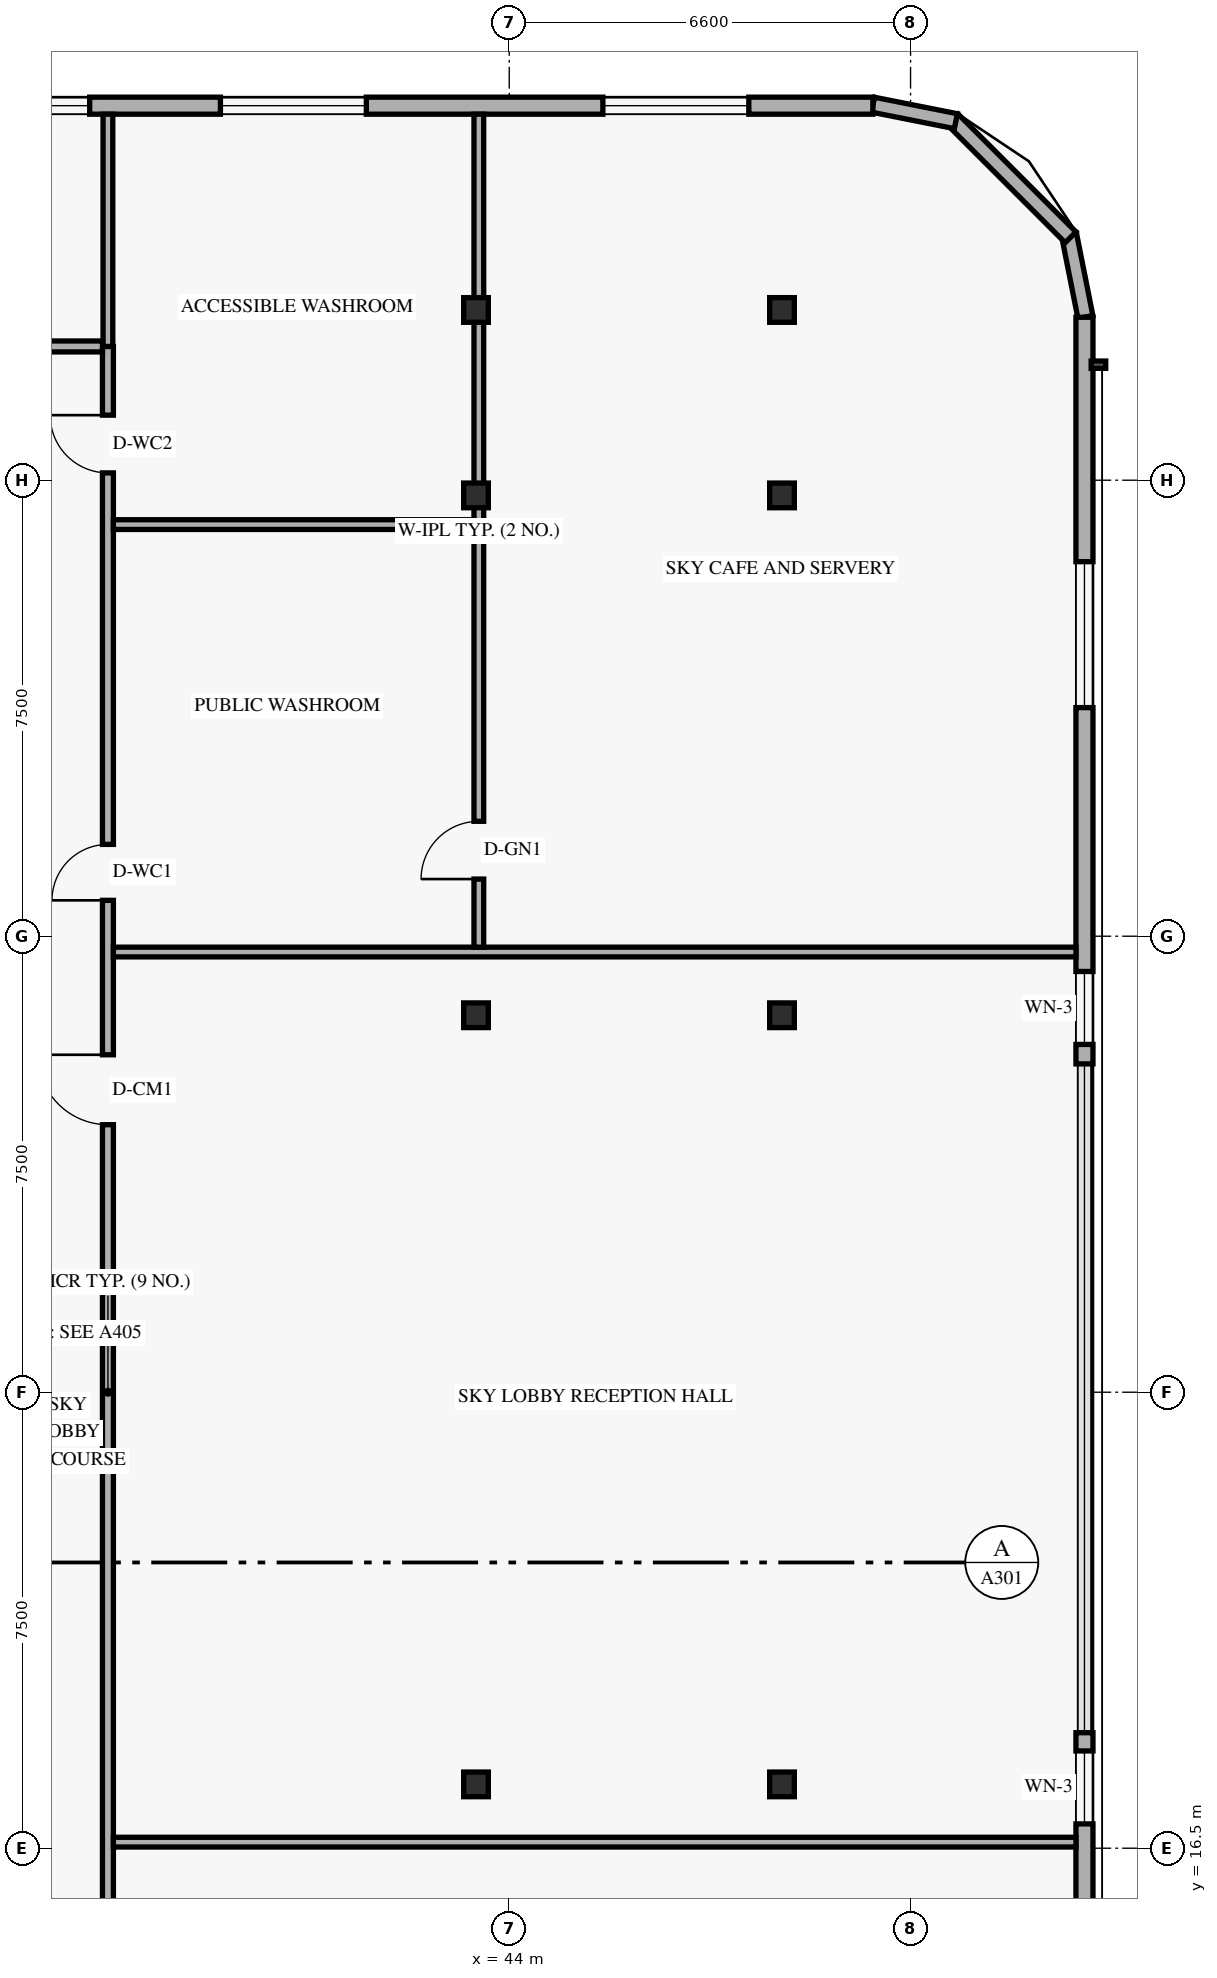
"""IFC4 building model, lengths in metres.
Left out: names, types, materials, properties, quantities, classifications, styles, units other than length and angle.
Written with IfcOpenShell. Run it as: python <this file> out.ifc"""

import sys

from ifc_helpers import new_model, si_unit, direction, frame, frame_2d, origin, origin_2d, place, context, subcontext, project, spatial, rectangle, hollow_rectangle, extrude, element, fill, save


model = new_model("IFC4")
c1 = context("Model", 3, precision=1e-05, world=origin(), true_north=direction((0.0, 1.0)))
c2 = subcontext(c1, "Body", "Model", "MODEL_VIEW")
j1 = project(units=[si_unit("LENGTHUNIT", "METRE"), si_unit("PLANEANGLEUNIT", "RADIAN")], contexts=[c1])
p1 = place(None, origin())
s1 = spatial("IfcSite", under=j1, at=p1, CompositionType="ELEMENT")
p2 = place(p1, origin())
s2 = spatial("IfcBuilding", under=s1, at=p2, CompositionType="ELEMENT")
p3 = place(p2, frame((0.0, 0.0, 98.4)))
s3 = spatial("IfcBuildingStorey", under=s2, at=p3, CompositionType="ELEMENT", Elevation=98.4)
for number, where, z_axis, x_axis in (
    (1, (43.38, 17.55, 0.0), (0.035, 0.0, 0.999), (0.0, 1.0, 0.0)),
    (2, (43.38, 30.2, 0.0), (0.035, 0.0, 0.999), (0.0, 1.0, 0.0)),
    (3, (43.38, 38.75, 0.0), (0.035, 0.0, 0.999), (0.0, 1.0, 0.0)),
    (4, (43.38, 41.8, 0.0), (0.035, 0.0, 0.999), (0.0, 1.0, 0.0)),
):
    element("IfcColumn", number, at=place(p3, frame(where, z_axis=z_axis, x_axis=x_axis)), inside=s3, PredefinedType="COLUMN", context=c2, shape_type="SweptSolid", body=[
        extrude(hollow_rectangle(XDim=0.406, YDim=0.406, WallThickness=0.016, at=origin_2d()), origin(), (0.0, 0.0, 1.0), 4.203),
    ])
for number, where, z_axis, x_axis in (
    (5, (48.364, 17.55, 0.0), (0.058, 0.0, 0.998), (0.0, 1.0, 0.0)),
    (6, (48.364, 30.2, 0.0), (0.058, 0.0, 0.998), (0.0, 1.0, 0.0)),
    (7, (48.364, 38.75, 0.0), (0.058, 0.0, 0.998), (0.0, 1.0, 0.0)),
    (8, (48.364, 41.8, 0.0), (0.058, 0.0, 0.998), (0.0, 1.0, 0.0)),
):
    element("IfcColumn", number, at=place(p3, frame(where, z_axis=z_axis, x_axis=x_axis)), inside=s3, PredefinedType="COLUMN", context=c2, shape_type="SweptSolid", body=[
        extrude(hollow_rectangle(XDim=0.406, YDim=0.406, WallThickness=0.016, at=origin_2d()), origin(), (0.0, 0.0, 1.0), 4.207),
    ])
p4 = place(p3, frame((53.476, 41.684, 0.0), z_axis=(0.0, 0.0, 1.0), x_axis=(-0.195000137217, 0.980803214965, 0.0)))
e9 = element("IfcWall", 9, at=p4, inside=s3, PredefinedType="SOLIDWALL", context=c2, shape_type="SweptSolid", body=[
    extrude(rectangle(XDim=1.388, YDim=0.25, at=frame_2d((0.694, 0.0))), origin(), (0.0, 0.0, 1.0), 3.96),
])
p5 = place(p3, frame((53.232, 42.995, 0.0), z_axis=(0.0, 0.0, 1.0), x_axis=(-0.707151344399, 0.707062215165, 0.0)))
e10 = element("IfcWall", 10, at=p5, inside=s3, PredefinedType="SOLIDWALL", context=c2, shape_type="SweptSolid", body=[
    extrude(rectangle(XDim=2.739, YDim=0.25, at=frame_2d((1.37, 0.0))), origin(), (0.0, 0.0, 1.0), 3.96),
])
p6 = place(p3, frame((51.345, 44.905, 0.0), z_axis=(0.0, 0.0, 1.0), x_axis=(-0.980809899341, 0.19496651342, 0.0)))
e11 = element("IfcWall", 11, at=p6, inside=s3, PredefinedType="SOLIDWALL", context=c2, shape_type="SweptSolid", body=[
    extrude(rectangle(XDim=1.389, YDim=0.25, at=frame_2d((0.694, 0.0))), origin(), (0.0, 0.0, 1.0), 3.96),
])
p7 = place(p3, frame((53.46, 6.32, 0.0), z_axis=(0.0, 0.0, 1.0), x_axis=(0.0, 1.0, 0.0)))
e12 = element("IfcWall", 12, at=p7, inside=s3, PredefinedType="SOLIDWALL", context=c2, shape_type="SweptSolid", body=[
    extrude(rectangle(XDim=12.08, YDim=0.28, at=frame_2d((6.04, 0.0))), origin(), (0.0, 0.0, 1.0), 3.96),
])
p8 = place(p7, frame((3.94, 0.0, 0.85)))
e13 = element("IfcOpeningElement", 13, at=p8, cuts=e12, PredefinedType="OPENING", context=c2, shape_type="SweptSolid", body=[
    extrude(rectangle(XDim=2.4, YDim=1.9, at=frame_2d((1.2, 0.95))), frame((0.0, 0.15, 0.0), z_axis=(0.0, -1.0, 0.0), x_axis=(1.0, 0.0, 0.0)), (0.0, 0.0, 1.0), 0.3),
])
p9 = place(p7, frame((10.58, 0.0, 0.85)))
e14 = element("IfcOpeningElement", 14, at=p9, cuts=e12, PredefinedType="OPENING", context=c2, shape_type="SweptSolid", body=[
    extrude(rectangle(XDim=1.2, YDim=1.5, at=frame_2d((0.6, 0.75))), frame((0.0, 0.15, 0.0), z_axis=(0.0, -1.0, 0.0), x_axis=(1.0, 0.0, 0.0)), (0.0, 0.0, 1.0), 0.3),
])
p10 = place(p3, frame((53.46, 29.4, 0.0), z_axis=(0.0, 0.0, 1.0), x_axis=(0.0, 1.0, 0.0)))
e15 = element("IfcWall", 15, at=p10, inside=s3, PredefinedType="SOLIDWALL", context=c2, shape_type="SweptSolid", body=[
    extrude(rectangle(XDim=12.28, YDim=0.28, at=frame_2d((6.14, 0.0))), origin(), (0.0, 0.0, 1.0), 3.96),
])
p11 = place(p10, frame((0.32, 0.0, 0.85)))
e16 = element("IfcOpeningElement", 16, at=p11, cuts=e15, PredefinedType="OPENING", context=c2, shape_type="SweptSolid", body=[
    extrude(rectangle(XDim=1.2, YDim=1.5, at=frame_2d((0.6, 0.75))), frame((0.0, 0.15, 0.0), z_axis=(0.0, -1.0, 0.0), x_axis=(1.0, 0.0, 0.0)), (0.0, 0.0, 1.0), 0.3),
])
p12 = place(p10, frame((5.86, 0.0, 0.85)))
e17 = element("IfcOpeningElement", 17, at=p12, cuts=e15, PredefinedType="OPENING", context=c2, shape_type="SweptSolid", body=[
    extrude(rectangle(XDim=2.4, YDim=1.9, at=frame_2d((1.2, 0.95))), frame((0.0, 0.15, 0.0), z_axis=(0.0, -1.0, 0.0), x_axis=(1.0, 0.0, 0.0)), (0.0, 0.0, 1.0), 0.3),
])
p13 = place(p3, frame((49.98, 45.16, 0.0), z_axis=(0.0, 0.0, 1.0), x_axis=(-1.0, 0.0, 0.0)))
e18 = element("IfcWall", 18, at=p13, inside=s3, PredefinedType="SOLIDWALL", context=c2, shape_type="SweptSolid", body=[
    extrude(rectangle(XDim=15.58, YDim=0.28, at=frame_2d((7.79, 0.0))), origin(), (0.0, 0.0, 1.0), 3.96),
])
p14 = place(p13, frame((12.88, 0.0, 0.85)))
e19 = element("IfcOpeningElement", 19, at=p14, cuts=e18, PredefinedType="OPENING", context=c2, shape_type="SweptSolid", body=[
    extrude(rectangle(XDim=2.4, YDim=1.9, at=frame_2d((1.2, 0.95))), frame((0.0, 0.15, 0.0), z_axis=(0.0, -1.0, 0.0), x_axis=(1.0, 0.0, 0.0)), (0.0, 0.0, 1.0), 0.3),
])
p15 = place(p13, frame((8.33, 0.0, 0.85)))
e20 = element("IfcOpeningElement", 20, at=p15, cuts=e18, PredefinedType="OPENING", context=c2, shape_type="SweptSolid", body=[
    extrude(rectangle(XDim=2.4, YDim=1.9, at=frame_2d((1.2, 0.95))), frame((0.0, 0.15, 0.0), z_axis=(0.0, -1.0, 0.0), x_axis=(1.0, 0.0, 0.0)), (0.0, 0.0, 1.0), 0.3),
])
p16 = place(p13, frame((2.04, 0.0, 0.85)))
e21 = element("IfcOpeningElement", 21, at=p16, cuts=e18, PredefinedType="OPENING", context=c2, shape_type="SweptSolid", body=[
    extrude(rectangle(XDim=2.4, YDim=1.9, at=frame_2d((1.2, 0.95))), frame((0.0, 0.15, 0.0), z_axis=(0.0, -1.0, 0.0), x_axis=(1.0, 0.0, 0.0)), (0.0, 0.0, 1.0), 0.3),
])
p17 = place(p3, frame((37.4, 6.8, 0.0), z_axis=(0.0, 0.0, 1.0), x_axis=(0.0, 1.0, 0.0)))
e22 = element("IfcWall", 22, at=p17, inside=s3, PredefinedType="STANDARD", context=c2, shape_type="SweptSolid", body=[
    extrude(rectangle(XDim=34.4, YDim=0.18, at=frame_2d((17.2, 0.0))), origin(), (0.0, 0.0, 1.0), 3.331),
])
p18 = place(p17, frame((25.29, 0.0, 0.0)))
e23 = element("IfcOpeningElement", 23, at=p18, cuts=e22, PredefinedType="OPENING", context=c2, shape_type="SweptSolid", body=[
    extrude(rectangle(XDim=0.92, YDim=2.14, at=frame_2d((0.46, 1.07))), frame((0.0, 0.1, 0.0), z_axis=(0.0, -1.0, 0.0), x_axis=(1.0, 0.0, 0.0)), (0.0, 0.0, 1.0), 0.2),
])
p19 = place(p17, frame((32.32, 0.0, 0.0)))
e24 = element("IfcOpeningElement", 24, at=p19, cuts=e22, PredefinedType="OPENING", context=c2, shape_type="SweptSolid", body=[
    extrude(rectangle(XDim=0.95, YDim=2.14, at=frame_2d((0.475, 1.07))), frame((0.0, 0.1, 0.0), z_axis=(0.0, -1.0, 0.0), x_axis=(1.0, 0.0, 0.0)), (0.0, 0.0, 1.0), 0.2),
])
p20 = place(p17, frame((2.8, 0.0, 0.0)))
e25 = element("IfcOpeningElement", 25, at=p20, cuts=e22, PredefinedType="OPENING", context=c2, shape_type="SweptSolid", body=[
    extrude(rectangle(XDim=1.15, YDim=2.15, at=frame_2d((0.575, 1.075))), frame((0.0, 0.1, 0.0), z_axis=(0.0, -1.0, 0.0), x_axis=(1.0, 0.0, 0.0)), (0.0, 0.0, 1.0), 0.2),
])
p21 = place(p17, frame((21.6, 0.0, 0.0)))
e26 = element("IfcOpeningElement", 26, at=p21, cuts=e22, PredefinedType="OPENING", context=c2, shape_type="SweptSolid", body=[
    extrude(rectangle(XDim=1.15, YDim=2.15, at=frame_2d((0.575, 1.075))), frame((0.0, 0.1, 0.0), z_axis=(0.0, -1.0, 0.0), x_axis=(1.0, 0.0, 0.0)), (0.0, 0.0, 1.0), 0.2),
])
p22 = place(p3, frame((37.4, 41.2, 0.0), z_axis=(0.0, 0.0, 1.0), x_axis=(0.0, 1.0, 0.0)))
e27 = element("IfcWall", 27, at=p22, inside=s3, PredefinedType="PARTITIONING", context=c2, shape_type="SweptSolid", body=[
    extrude(rectangle(XDim=3.82, YDim=0.16, at=frame_2d((1.91, 0.0))), origin(), (0.0, 0.0, 1.0), 3.409),
])
for number, where, z_axis, x_axis in (
    (28, (37.49, 16.6, 0.0), (0.0, 0.0, 1.0), (1.0, 0.0, 0.0)),
    (29, (37.49, 31.24, 0.0), (0.0, 0.0, 1.0), (1.0, 0.0, 0.0)),
):
    element("IfcWall", number, at=place(p3, frame(where, z_axis=z_axis, x_axis=x_axis)), inside=s3, PredefinedType="PARTITIONING", context=c2, shape_type="SweptSolid", body=[
        extrude(rectangle(XDim=15.83, YDim=0.16, at=frame_2d((7.915, 0.0))), origin(), (0.0, 0.0, 1.0), 3.331),
    ])
p23 = place(p3, frame((43.5, 31.32, 0.0), z_axis=(0.0, 0.0, 1.0), x_axis=(0.0, 1.0, 0.0)))
e30 = element("IfcWall", 30, at=p23, inside=s3, PredefinedType="PLUMBINGWALL", context=c2, shape_type="SweptSolid", body=[
    extrude(rectangle(XDim=13.7, YDim=0.16, at=frame_2d((6.85, 0.0))), origin(), (0.0, 0.0, 1.0), 3.331),
])
p24 = place(p23, frame((1.12, 0.0, 0.0)))
e31 = element("IfcOpeningElement", 31, at=p24, cuts=e30, PredefinedType="OPENING", context=c2, shape_type="SweptSolid", body=[
    extrude(rectangle(XDim=0.95, YDim=2.15, at=frame_2d((0.475, 1.075))), frame((0.0, 0.09, 0.0), z_axis=(0.0, -1.0, 0.0), x_axis=(1.0, 0.0, 0.0)), (0.0, 0.0, 1.0), 0.18),
])
p25 = place(p3, frame((37.49, 38.27, 0.0), z_axis=(0.0, 0.0, 1.0), x_axis=(1.0, 0.0, 0.0)))
e32 = element("IfcWall", 32, at=p25, inside=s3, PredefinedType="PLUMBINGWALL", context=c2, shape_type="SweptSolid", body=[
    extrude(rectangle(XDim=5.93, YDim=0.16, at=frame_2d((2.965, 0.0))), origin(), (0.0, 0.0, 1.0), 3.331),
])
p26 = place(p3, frame((21.74, 41.2, 0.0), z_axis=(0.0, 0.0, 1.0), x_axis=(1.0, 0.0, 0.0)))
e33 = element("IfcWall", 33, at=p26, inside=s3, PredefinedType="STANDARD", context=c2, shape_type="SweptSolid", body=[
    extrude(rectangle(XDim=15.57, YDim=0.18, at=frame_2d((7.785, 0.0))), origin(), (0.0, 0.0, 1.0), 3.331),
])
p27 = place(p26, frame((5.41, 0.0, 0.0)))
e34 = element("IfcOpeningElement", 34, at=p27, cuts=e33, PredefinedType="OPENING", context=c2, shape_type="SweptSolid", body=[
    extrude(rectangle(XDim=0.95, YDim=2.15, at=frame_2d((0.475, 1.075))), frame((0.0, 0.1, 0.0), z_axis=(0.0, -1.0, 0.0), x_axis=(1.0, 0.0, 0.0)), (0.0, 0.0, 1.0), 0.2),
])
p28 = place(p9, origin())
e35 = element("IfcWindow", 35, at=p28, inside=s3, PartitioningType="SINGLE_PANEL", PredefinedType="WINDOW", context=c2, shape_type="SweptSolid", body=[
    extrude(rectangle(XDim=1.2, YDim=1.5, at=frame_2d((0.6, 0.75))), frame((0.0, 0.03, 0.0), z_axis=(0.0, -1.0, 0.0), x_axis=(1.0, 0.0, 0.0)), (0.0, 0.0, 1.0), 0.06),
])
fill(e14, e35)
p29 = place(p11, origin())
e36 = element("IfcWindow", 36, at=p29, inside=s3, PartitioningType="SINGLE_PANEL", PredefinedType="WINDOW", context=c2, shape_type="SweptSolid", body=[
    extrude(rectangle(XDim=1.2, YDim=1.5, at=frame_2d((0.6, 0.75))), frame((0.0, 0.03, 0.0), z_axis=(0.0, -1.0, 0.0), x_axis=(1.0, 0.0, 0.0)), (0.0, 0.0, 1.0), 0.06),
])
fill(e16, e36)
p30 = place(p12, origin())
e37 = element("IfcWindow", 37, at=p30, inside=s3, PartitioningType="SINGLE_PANEL", PredefinedType="WINDOW", context=c2, shape_type="SweptSolid", body=[
    extrude(rectangle(XDim=2.4, YDim=1.9, at=frame_2d((1.2, 0.95))), frame((0.0, 0.03, 0.0), z_axis=(0.0, -1.0, 0.0), x_axis=(1.0, 0.0, 0.0)), (0.0, 0.0, 1.0), 0.06),
])
fill(e17, e37)
p31 = place(p14, origin())
e38 = element("IfcWindow", 38, at=p31, inside=s3, PartitioningType="SINGLE_PANEL", PredefinedType="WINDOW", context=c2, shape_type="SweptSolid", body=[
    extrude(rectangle(XDim=2.4, YDim=1.9, at=frame_2d((1.2, 0.95))), frame((0.0, 0.03, 0.0), z_axis=(0.0, -1.0, 0.0), x_axis=(1.0, 0.0, 0.0)), (0.0, 0.0, 1.0), 0.06),
])
fill(e19, e38)
p32 = place(p15, origin())
e39 = element("IfcWindow", 39, at=p32, inside=s3, PartitioningType="SINGLE_PANEL", PredefinedType="WINDOW", context=c2, shape_type="SweptSolid", body=[
    extrude(rectangle(XDim=2.4, YDim=1.9, at=frame_2d((1.2, 0.95))), frame((0.0, 0.03, 0.0), z_axis=(0.0, -1.0, 0.0), x_axis=(1.0, 0.0, 0.0)), (0.0, 0.0, 1.0), 0.06),
])
fill(e20, e39)
p33 = place(p16, origin())
e40 = element("IfcWindow", 40, at=p33, inside=s3, PartitioningType="SINGLE_PANEL", PredefinedType="WINDOW", context=c2, shape_type="SweptSolid", body=[
    extrude(rectangle(XDim=2.4, YDim=1.9, at=frame_2d((1.2, 0.95))), frame((0.0, 0.03, 0.0), z_axis=(0.0, -1.0, 0.0), x_axis=(1.0, 0.0, 0.0)), (0.0, 0.0, 1.0), 0.06),
])
fill(e21, e40)
p34 = place(p18, origin())
e41 = element("IfcDoor", 41, at=p34, inside=s3, OperationType="SINGLE_SWING_LEFT", PredefinedType="DOOR", context=c2, shape_type="SweptSolid", body=[
    extrude(rectangle(XDim=0.92, YDim=2.14, at=frame_2d((0.46, 1.07))), frame((0.0, 0.025, 0.0), z_axis=(0.0, -1.0, 0.0), x_axis=(1.0, 0.0, 0.0)), (0.0, 0.0, 1.0), 0.05),
])
fill(e23, e41)
p35 = place(p19, origin())
e42 = element("IfcDoor", 42, at=p35, inside=s3, OperationType="SINGLE_SWING_RIGHT", PredefinedType="DOOR", context=c2, shape_type="SweptSolid", body=[
    extrude(rectangle(XDim=0.95, YDim=2.14, at=frame_2d((0.475, 1.07))), frame((0.0, 0.025, 0.0), z_axis=(0.0, -1.0, 0.0), x_axis=(1.0, 0.0, 0.0)), (0.0, 0.0, 1.0), 0.05),
])
fill(e24, e42)
p36 = place(p24, origin())
e43 = element("IfcDoor", 43, at=p36, inside=s3, OperationType="SINGLE_SWING_LEFT", PredefinedType="DOOR", context=c2, shape_type="SweptSolid", body=[
    extrude(rectangle(XDim=0.95, YDim=2.15, at=frame_2d((0.475, 1.075))), frame((0.0, 0.025, 0.0), z_axis=(0.0, -1.0, 0.0), x_axis=(1.0, 0.0, 0.0)), (0.0, 0.0, 1.0), 0.05),
])
fill(e31, e43)
p37 = place(p21, origin())
e44 = element("IfcDoor", 44, at=p37, inside=s3, OperationType="SINGLE_SWING_RIGHT", PredefinedType="DOOR", context=c2, shape_type="SweptSolid", body=[
    extrude(rectangle(XDim=1.15, YDim=2.15, at=frame_2d((0.575, 1.075))), frame((0.0, 0.025, 0.0), z_axis=(0.0, -1.0, 0.0), x_axis=(1.0, 0.0, 0.0)), (0.0, 0.0, 1.0), 0.05),
])
fill(e26, e44)
save(model, sys.argv[1])
